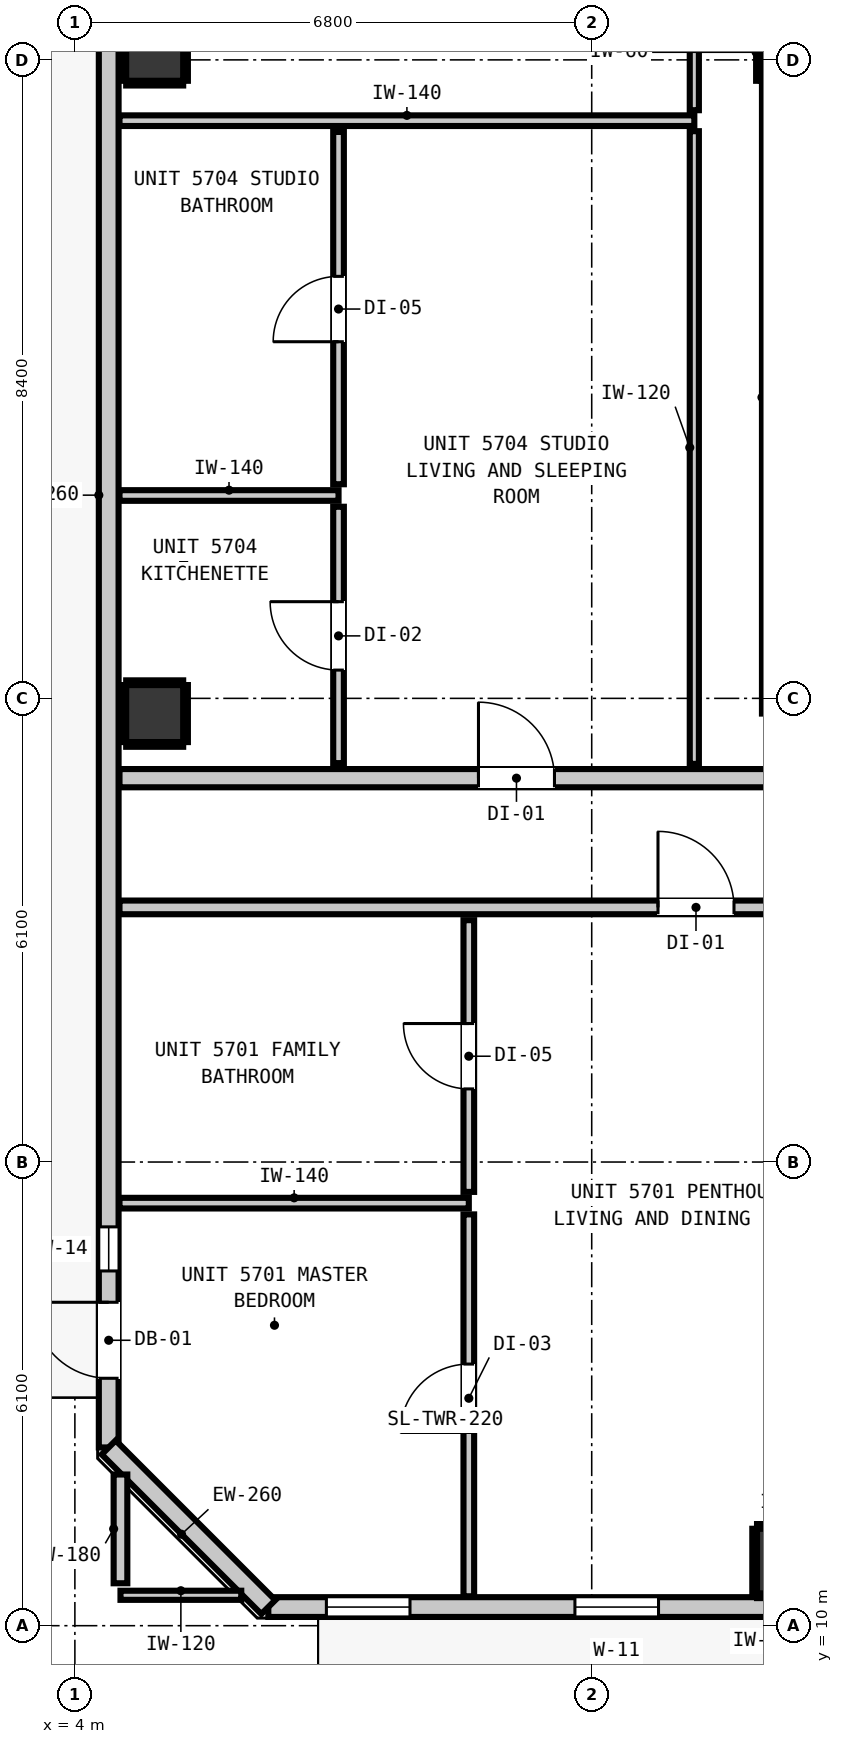
"""IFC4 building model, lengths in metres.
Left out: names, types, materials, properties, quantities, classifications, styles, units other than length and angle.
Written with IfcOpenShell. Run it as: python <this file> out.ifc"""

import sys

from ifc_helpers import new_model, si_unit, direction, frame, frame_2d, origin, origin_2d, place, context, subcontext, project, spatial, rectangle, extrude, element, fill, save


model = new_model("IFC4")
c1 = context("Model", 3, precision=1e-05, world=origin(), true_north=direction((0.0, 1.0)))
c2 = subcontext(c1, "Body", "Model", "MODEL_VIEW")
j1 = project(units=[si_unit("LENGTHUNIT", "METRE"), si_unit("PLANEANGLEUNIT", "RADIAN")], contexts=[c1])
p1 = place(None, origin())
s1 = spatial("IfcSite", under=j1, at=p1, CompositionType="ELEMENT")
p2 = place(p1, origin())
s2 = spatial("IfcBuilding", under=s1, at=p2, CompositionType="ELEMENT")
p3 = place(p2, frame((0.0, 0.0, 196.8)))
s3 = spatial("IfcBuildingStorey", under=s2, at=p3, CompositionType="ELEMENT", Elevation=196.8)
p4 = place(p3, frame((13.4, 30.7, 0.0), z_axis=(0.0, 0.0, 1.0), x_axis=(1.0, 0.0, 0.0)))
e1 = element("IfcColumn", 1, at=p4, inside=s3, PredefinedType="COLUMN", context=c2, shape_type="SweptSolid", body=[
    extrude(rectangle(XDim=0.75, YDim=0.75, at=origin_2d()), origin(), (0.0, 0.0, 1.0), 3.32),
])
p5 = place(p3, frame((13.44, 22.0, 0.0), z_axis=(0.0, 0.0, 1.0), x_axis=(0.0, 1.0, 0.0)))
e2 = element("IfcWall", 2, at=p5, inside=s3, PredefinedType="SHEAR", context=c2, shape_type="SweptSolid", body=[
    extrude(rectangle(XDim=8.32, YDim=0.8, at=frame_2d((4.16, 0.0))), origin(), (0.0, 0.0, 1.0), 3.32),
])
p6 = place(p3, frame((13.4, 10.85, 0.0), z_axis=(0.0, 0.0, 1.0), x_axis=(1.0, 0.0, 0.0)))
e3 = element("IfcColumn", 3, at=p6, inside=s3, PredefinedType="COLUMN", context=c2, shape_type="SweptSolid", body=[
    extrude(rectangle(XDim=0.85, YDim=0.85, at=origin_2d()), origin(), (0.0, 0.0, 1.0), 3.32),
])
for number, where, z_axis, x_axis in (
    (4, (5.05, 22.0, 0.0), (0.0, 0.0, 1.0), (1.0, 0.0, 0.0)),
    (5, (5.05, 30.7, 0.0), (0.0, 0.0, 1.0), (1.0, 0.0, 0.0)),
):
    element("IfcColumn", number, at=place(p3, frame(where, z_axis=z_axis, x_axis=x_axis)), inside=s3, PredefinedType="COLUMN", context=c2, shape_type="SweptSolid", body=[
        extrude(rectangle(XDim=0.75, YDim=0.75, at=origin_2d()), origin(), (0.0, 0.0, 1.0), 3.32),
    ])
p7 = place(p3, frame((4.445, 12.345, 0.0), z_axis=(0.0, 0.0, 1.0), x_axis=(0.0, 1.0, 0.0)))
e6 = element("IfcWall", 6, at=p7, inside=s3, PredefinedType="STANDARD", context=c2, shape_type="SweptSolid", body=[
    extrude(rectangle(XDim=30.31, YDim=0.26, at=frame_2d((15.155, 0.0))), origin(), (0.0, 0.0, 1.0), 3.1),
])
p8 = place(p7, frame((0.91, 0.0, 0.0)))
e7 = element("IfcOpeningElement", 7, at=p8, cuts=e6, PredefinedType="OPENING", context=c2, shape_type="SweptSolid", body=[
    extrude(rectangle(XDim=1.0, YDim=2.15, at=frame_2d((0.5, 1.075))), frame((0.0, 0.14, 0.0), z_axis=(0.0, -1.0, 0.0), x_axis=(1.0, 0.0, 0.0)), (0.0, 0.0, 1.0), 0.28),
])
p9 = place(p7, frame((2.322, 0.0, 0.85)))
e8 = element("IfcOpeningElement", 8, at=p9, cuts=e6, PredefinedType="OPENING", context=c2, shape_type="SweptSolid", body=[
    extrude(rectangle(XDim=0.58, YDim=1.5, at=frame_2d((0.29, 0.75))), frame((0.0, 0.14, 0.0), z_axis=(0.0, -1.0, 0.0), x_axis=(1.0, 0.0, 0.0)), (0.0, 0.0, 1.0), 0.28),
])
p10 = place(p7, frame((22.155, 0.0, 0.85)))
e9 = element("IfcOpeningElement", 9, at=p10, cuts=e6, PredefinedType="OPENING", context=c2, shape_type="SweptSolid", body=[
    extrude(rectangle(XDim=1.1, YDim=2.05, at=frame_2d((0.55, 1.025))), frame((0.0, 0.14, 0.0), z_axis=(0.0, -1.0, 0.0), x_axis=(1.0, 0.0, 0.0)), (0.0, 0.0, 1.0), 0.28),
])
p11 = place(p3, frame((39.255, 10.245, 0.0), z_axis=(0.0, 0.0, 1.0), x_axis=(-1.0, 0.0, 0.0)))
e10 = element("IfcWall", 10, at=p11, inside=s3, PredefinedType="STANDARD", context=c2, shape_type="SweptSolid", body=[
    extrude(rectangle(XDim=32.71, YDim=0.26, at=frame_2d((16.355, 0.0))), origin(), (0.0, 0.0, 1.0), 3.1),
])
p12 = place(p11, frame((3.721, 0.0, 0.0)))
e11 = element("IfcOpeningElement", 11, at=p12, cuts=e10, PredefinedType="OPENING", context=c2, shape_type="SweptSolid", body=[
    extrude(rectangle(XDim=1.0, YDim=2.15, at=frame_2d((0.5, 1.075))), frame((0.0, 0.14, 0.0), z_axis=(0.0, -1.0, 0.0), x_axis=(1.0, 0.0, 0.0)), (0.0, 0.0, 1.0), 0.28),
])
p13 = place(p11, frame((27.576, 0.0, 0.85)))
e12 = element("IfcOpeningElement", 12, at=p13, cuts=e10, PredefinedType="OPENING", context=c2, shape_type="SweptSolid", body=[
    extrude(rectangle(XDim=1.1, YDim=2.05, at=frame_2d((0.55, 1.025))), frame((0.0, 0.14, 0.0), z_axis=(0.0, -1.0, 0.0), x_axis=(1.0, 0.0, 0.0)), (0.0, 0.0, 1.0), 0.28),
])
p14 = place(p11, frame((30.846, 0.0, 0.85)))
e13 = element("IfcOpeningElement", 13, at=p14, cuts=e10, PredefinedType="OPENING", context=c2, shape_type="SweptSolid", body=[
    extrude(rectangle(XDim=1.1, YDim=2.05, at=frame_2d((0.55, 1.025))), frame((0.0, 0.14, 0.0), z_axis=(0.0, -1.0, 0.0), x_axis=(1.0, 0.0, 0.0)), (0.0, 0.0, 1.0), 0.28),
])
p15 = place(p11, frame((21.515, 0.0, 0.85)))
e14 = element("IfcOpeningElement", 14, at=p15, cuts=e10, PredefinedType="OPENING", context=c2, shape_type="SweptSolid", body=[
    extrude(rectangle(XDim=1.1, YDim=2.05, at=frame_2d((0.55, 1.025))), frame((0.0, 0.14, 0.0), z_axis=(0.0, -1.0, 0.0), x_axis=(1.0, 0.0, 0.0)), (0.0, 0.0, 1.0), 0.28),
])
p16 = place(p11, frame((15.878, 0.0, 0.85)))
e15 = element("IfcOpeningElement", 15, at=p16, cuts=e10, PredefinedType="OPENING", context=c2, shape_type="SweptSolid", body=[
    extrude(rectangle(XDim=1.1, YDim=2.05, at=frame_2d((0.55, 1.025))), frame((0.0, 0.14, 0.0), z_axis=(0.0, -1.0, 0.0), x_axis=(1.0, 0.0, 0.0)), (0.0, 0.0, 1.0), 0.28),
])
p17 = place(p11, frame((7.632, 0.0, 0.85)))
e16 = element("IfcOpeningElement", 16, at=p17, cuts=e10, PredefinedType="OPENING", context=c2, shape_type="SweptSolid", body=[
    extrude(rectangle(XDim=1.1, YDim=2.05, at=frame_2d((0.55, 1.025))), frame((0.0, 0.14, 0.0), z_axis=(0.0, -1.0, 0.0), x_axis=(1.0, 0.0, 0.0)), (0.0, 0.0, 1.0), 0.28),
])
p18 = place(p11, frame((12.631, 0.0, 0.85)))
e17 = element("IfcOpeningElement", 17, at=p18, cuts=e10, PredefinedType="OPENING", context=c2, shape_type="SweptSolid", body=[
    extrude(rectangle(XDim=1.1, YDim=2.05, at=frame_2d((0.55, 1.025))), frame((0.0, 0.14, 0.0), z_axis=(0.0, -1.0, 0.0), x_axis=(1.0, 0.0, 0.0)), (0.0, 0.0, 1.0), 0.28),
])
p19 = place(p11, frame((5.177, 0.0, 0.85)))
e18 = element("IfcOpeningElement", 18, at=p19, cuts=e10, PredefinedType="OPENING", context=c2, shape_type="SweptSolid", body=[
    extrude(rectangle(XDim=1.1, YDim=2.05, at=frame_2d((0.55, 1.025))), frame((0.0, 0.14, 0.0), z_axis=(0.0, -1.0, 0.0), x_axis=(1.0, 0.0, 0.0)), (0.0, 0.0, 1.0), 0.28),
])
p20 = place(p11, frame((0.293, 0.0, 0.85)))
e19 = element("IfcOpeningElement", 19, at=p20, cuts=e10, PredefinedType="OPENING", context=c2, shape_type="SweptSolid", body=[
    extrude(rectangle(XDim=0.58, YDim=1.5, at=frame_2d((0.29, 0.75))), frame((0.0, 0.14, 0.0), z_axis=(0.0, -1.0, 0.0), x_axis=(1.0, 0.0, 0.0)), (0.0, 0.0, 1.0), 0.28),
])
p21 = place(p3, frame((6.545, 10.245, 0.0), z_axis=(0.0, 0.0, 1.0), x_axis=(-0.707106781187, 0.707106781187, 0.0)))
e20 = element("IfcWall", 20, at=p21, inside=s3, PredefinedType="STANDARD", context=c2, shape_type="SweptSolid", body=[
    extrude(rectangle(XDim=2.97, YDim=0.26, at=frame_2d((1.485, 0.0))), origin(), (0.0, 0.0, 1.0), 3.1),
])
p22 = place(p3, frame((4.587, 21.15, 0.0), z_axis=(0.0, 0.0, 1.0), x_axis=(1.0, 0.0, 0.0)))
e21 = element("IfcWall", 21, at=p22, inside=s3, PredefinedType="PARTITIONING", context=c2, shape_type="SweptSolid", body=[
    extrude(rectangle(XDim=36.626, YDim=0.24, at=frame_2d((18.313, 0.0))), origin(), (0.0, 0.0, 1.0), 3.1),
])
p23 = place(p22, frame((13.623, 0.0, 0.0)))
e22 = element("IfcOpeningElement", 22, at=p23, cuts=e21, PredefinedType="OPENING", context=c2, shape_type="SweptSolid", body=[
    extrude(rectangle(XDim=1.1, YDim=2.15, at=frame_2d((0.55, 1.075))), frame((0.0, 0.13, 0.0), z_axis=(0.0, -1.0, 0.0), x_axis=(1.0, 0.0, 0.0)), (0.0, 0.0, 1.0), 0.26),
])
p24 = place(p22, frame((4.723, 0.0, 0.0)))
e23 = element("IfcOpeningElement", 23, at=p24, cuts=e21, PredefinedType="OPENING", context=c2, shape_type="SweptSolid", body=[
    extrude(rectangle(XDim=1.0, YDim=2.15, at=frame_2d((0.5, 1.075))), frame((0.0, 0.13, 0.0), z_axis=(0.0, -1.0, 0.0), x_axis=(1.0, 0.0, 0.0)), (0.0, 0.0, 1.0), 0.26),
])
p25 = place(p3, frame((4.587, 19.45, 0.0), z_axis=(0.0, 0.0, 1.0), x_axis=(1.0, 0.0, 0.0)))
e24 = element("IfcWall", 24, at=p25, inside=s3, PredefinedType="PARTITIONING", context=c2, shape_type="SweptSolid", body=[
    extrude(rectangle(XDim=36.626, YDim=0.18, at=frame_2d((18.313, 0.0))), origin(), (0.0, 0.0, 1.0), 3.1),
])
p26 = place(p25, frame((7.085, 0.0, 0.0)))
e25 = element("IfcOpeningElement", 25, at=p26, cuts=e24, PredefinedType="OPENING", context=c2, shape_type="SweptSolid", body=[
    extrude(rectangle(XDim=1.0, YDim=2.15, at=frame_2d((0.5, 1.075))), frame((0.0, 0.1, 0.0), z_axis=(0.0, -1.0, 0.0), x_axis=(1.0, 0.0, 0.0)), (0.0, 0.0, 1.0), 0.2),
])
p27 = place(p25, frame((25.034, 0.0, 0.0)))
e26 = element("IfcOpeningElement", 26, at=p27, cuts=e24, PredefinedType="OPENING", context=c2, shape_type="SweptSolid", body=[
    extrude(rectangle(XDim=1.0, YDim=2.15, at=frame_2d((0.5, 1.075))), frame((0.0, 0.1, 0.0), z_axis=(0.0, -1.0, 0.0), x_axis=(1.0, 0.0, 0.0)), (0.0, 0.0, 1.0), 0.2),
])
p28 = place(p3, frame((4.587, 15.559, 0.0), z_axis=(0.0, 0.0, 1.0), x_axis=(1.0, 0.0, 0.0)))
e27 = element("IfcWall", 27, at=p28, inside=s3, PredefinedType="PARTITIONING", context=c2, shape_type="SweptSolid", body=[
    extrude(rectangle(XDim=4.596, YDim=0.14, at=frame_2d((2.298, 0.0))), origin(), (0.0, 0.0, 1.0), 3.1),
])
p29 = place(p3, frame((4.587, 24.869, 0.0), z_axis=(0.0, 0.0, 1.0), x_axis=(1.0, 0.0, 0.0)))
e28 = element("IfcWall", 28, at=p29, inside=s3, PredefinedType="PARTITIONING", context=c2, shape_type="SweptSolid", body=[
    extrude(rectangle(XDim=2.882, YDim=0.14, at=frame_2d((1.441, 0.0))), origin(), (0.0, 0.0, 1.0), 3.1),
])
p30 = place(p3, frame((4.587, 29.8, 0.0), z_axis=(0.0, 0.0, 1.0), x_axis=(1.0, 0.0, 0.0)))
e29 = element("IfcWall", 29, at=p30, inside=s3, PredefinedType="PARTITIONING", context=c2, shape_type="SweptSolid", body=[
    extrude(rectangle(XDim=7.563, YDim=0.14, at=frame_2d((3.781, 0.0))), origin(), (0.0, 0.0, 1.0), 3.1),
])
p31 = place(p3, frame((4.6, 10.4, 0.0), z_axis=(0.0, 0.0, 1.0), x_axis=(1.0, 0.0, 0.0)))
e30 = element("IfcWall", 30, at=p31, inside=s3, PredefinedType="PARTITIONING", context=c2, shape_type="SweptSolid", body=[
    extrude(rectangle(XDim=1.589, YDim=0.12, at=frame_2d((0.794, 0.0))), origin(), (0.0, 0.0, 1.0), 3.1),
])
p32 = place(p3, frame((4.6, 10.558, 0.0), z_axis=(0.0, 0.0, 1.0), x_axis=(0.0, 1.0, 0.0)))
e31 = element("IfcWall", 31, at=p32, inside=s3, PredefinedType="PARTITIONING", context=c2, shape_type="SweptSolid", body=[
    extrude(rectangle(XDim=1.431, YDim=0.18, at=frame_2d((0.715, 0.0))), origin(), (0.0, 0.0, 1.0), 3.1),
])
p33 = place(p3, frame((7.469, 21.348, 0.0), z_axis=(0.0, 0.0, 1.0), x_axis=(0.0, 1.0, 0.0)))
e32 = element("IfcWall", 32, at=p33, inside=s3, PredefinedType="PARTITIONING", context=c2, shape_type="SweptSolid", body=[
    extrude(rectangle(XDim=3.373, YDim=0.14, at=frame_2d((1.687, 0.0))), origin(), (0.0, 0.0, 1.0), 3.1),
])
p34 = place(p33, frame((1.224, 0.0, 0.0)))
e33 = element("IfcOpeningElement", 33, at=p34, cuts=e32, PredefinedType="OPENING", context=c2, shape_type="SweptSolid", body=[
    extrude(rectangle(XDim=0.9, YDim=2.1, at=frame_2d((0.45, 1.05))), frame((0.0, 0.08, 0.0), z_axis=(0.0, -1.0, 0.0), x_axis=(1.0, 0.0, 0.0)), (0.0, 0.0, 1.0), 0.16),
])
p35 = place(p3, frame((7.469, 25.017, 0.0), z_axis=(0.0, 0.0, 1.0), x_axis=(0.0, 1.0, 0.0)))
e34 = element("IfcWall", 34, at=p35, inside=s3, PredefinedType="PARTITIONING", context=c2, shape_type="SweptSolid", body=[
    extrude(rectangle(XDim=4.635, YDim=0.14, at=frame_2d((2.317, 0.0))), origin(), (0.0, 0.0, 1.0), 3.1),
])
p36 = place(p35, frame((1.875, 0.0, 0.0)))
e35 = element("IfcOpeningElement", 35, at=p36, cuts=e34, PredefinedType="OPENING", context=c2, shape_type="SweptSolid", body=[
    extrude(rectangle(XDim=0.86, YDim=2.02, at=frame_2d((0.43, 1.01))), frame((0.0, 0.08, 0.0), z_axis=(0.0, -1.0, 0.0), x_axis=(1.0, 0.0, 0.0)), (0.0, 0.0, 1.0), 0.16),
])
p37 = place(p3, frame((9.183, 10.387, 0.0), z_axis=(0.0, 0.0, 1.0), x_axis=(0.0, 1.0, 0.0)))
e36 = element("IfcWall", 36, at=p37, inside=s3, PredefinedType="PARTITIONING", context=c2, shape_type="SweptSolid", body=[
    extrude(rectangle(XDim=5.024, YDim=0.14, at=frame_2d((2.512, 0.0))), origin(), (0.0, 0.0, 1.0), 3.1),
])
p38 = place(p37, frame((2.155, 0.0, 0.0)))
e37 = element("IfcOpeningElement", 37, at=p38, cuts=e36, PredefinedType="OPENING", context=c2, shape_type="SweptSolid", body=[
    extrude(rectangle(XDim=0.9, YDim=2.1, at=frame_2d((0.45, 1.05))), frame((0.0, 0.08, 0.0), z_axis=(0.0, -1.0, 0.0), x_axis=(1.0, 0.0, 0.0)), (0.0, 0.0, 1.0), 0.16),
])
p39 = place(p3, frame((9.183, 15.707, 0.0), z_axis=(0.0, 0.0, 1.0), x_axis=(0.0, 1.0, 0.0)))
e38 = element("IfcWall", 38, at=p39, inside=s3, PredefinedType="PARTITIONING", context=c2, shape_type="SweptSolid", body=[
    extrude(rectangle(XDim=3.575, YDim=0.14, at=frame_2d((1.788, 0.0))), origin(), (0.0, 0.0, 1.0), 2.477),
])
p40 = place(p39, frame((1.355, 0.0, 0.0)))
e39 = element("IfcOpeningElement", 39, at=p40, cuts=e38, PredefinedType="OPENING", context=c2, shape_type="SweptSolid", body=[
    extrude(rectangle(XDim=0.86, YDim=2.02, at=frame_2d((0.43, 1.01))), frame((0.0, 0.08, 0.0), z_axis=(0.0, -1.0, 0.0), x_axis=(1.0, 0.0, 0.0)), (0.0, 0.0, 1.0), 0.16),
])
p41 = place(p3, frame((12.15, 21.338, 0.0), z_axis=(0.0, 0.0, 1.0), x_axis=(0.0, 1.0, 0.0)))
e40 = element("IfcWall", 40, at=p41, inside=s3, PredefinedType="PARTITIONING", context=c2, shape_type="SweptSolid", body=[
    extrude(rectangle(XDim=8.324, YDim=0.12, at=frame_2d((4.162, 0.0))), origin(), (0.0, 0.0, 1.0), 3.1),
])
p42 = place(p3, frame((12.15, 29.938, 0.0), z_axis=(0.0, 0.0, 1.0), x_axis=(0.0, 1.0, 0.0)))
e41 = element("IfcWall", 41, at=p42, inside=s3, PredefinedType="PARTITIONING", context=c2, shape_type="SweptSolid", body=[
    extrude(rectangle(XDim=10.154, YDim=0.12, at=frame_2d((5.077, 0.0))), origin(), (0.0, 0.0, 1.0), 3.1),
])
p43 = place(p3, frame((12.993, 30.325, 0.0), z_axis=(0.0, 0.0, 1.0), x_axis=(0.0, 1.0, 0.0)))
e42 = element("IfcWall", 42, at=p43, inside=s3, PredefinedType="PARTITIONING", context=c2, shape_type="SweptSolid", body=[
    extrude(rectangle(XDim=0.75, YDim=0.06, at=frame_2d((0.375, 0.0))), origin(), (0.0, 0.0, 1.0), 1.45),
])
for number, where, z_axis, x_axis in (
    (43, (12.975, 10.393, 0.0), (0.0, 0.0, 1.0), (1.0, 0.0, 0.0)),
    (44, (12.975, 11.307, 0.0), (0.0, 0.0, 1.0), (1.0, 0.0, 0.0)),
    (45, (12.943, 10.425, 0.0), (0.0, 0.0, 1.0), (0.0, 1.0, 0.0)),
):
    element("IfcWall", number, at=place(p3, frame(where, z_axis=z_axis, x_axis=x_axis)), inside=s3, PredefinedType="PARTITIONING", context=c2, shape_type="SweptSolid", body=[
        extrude(rectangle(XDim=0.85, YDim=0.06, at=frame_2d((0.425, 0.0))), origin(), (0.0, 0.0, 1.0), 1.45),
    ])
for number, where, z_axis, x_axis in (
    (46, (4.675, 21.593, 0.0), (0.0, 0.0, 1.0), (1.0, 0.0, 0.0)),
    (47, (4.675, 22.407, 0.0), (0.0, 0.0, 1.0), (1.0, 0.0, 0.0)),
    (48, (4.643, 21.625, 0.0), (0.0, 0.0, 1.0), (0.0, 1.0, 0.0)),
    (49, (5.457, 21.625, 0.0), (0.0, 0.0, 1.0), (0.0, 1.0, 0.0)),
    (50, (4.675, 30.293, 0.0), (0.0, 0.0, 1.0), (1.0, 0.0, 0.0)),
    (51, (4.643, 30.325, 0.0), (0.0, 0.0, 1.0), (0.0, 1.0, 0.0)),
    (52, (5.457, 30.325, 0.0), (0.0, 0.0, 1.0), (0.0, 1.0, 0.0)),
):
    element("IfcWall", number, at=place(p3, frame(where, z_axis=z_axis, x_axis=x_axis)), inside=s3, PredefinedType="PARTITIONING", context=c2, shape_type="SweptSolid", body=[
        extrude(rectangle(XDim=0.75, YDim=0.06, at=frame_2d((0.375, 0.0))), origin(), (0.0, 0.0, 1.0), 1.45),
    ])
p44 = place(p8, origin())
e53 = element("IfcDoor", 53, at=p44, inside=s3, OperationType="SINGLE_SWING_RIGHT", PredefinedType="DOOR", context=c2, shape_type="SweptSolid", body=[
    extrude(rectangle(XDim=1.0, YDim=2.15, at=frame_2d((0.5, 1.075))), frame((0.0, 0.025, 0.0), z_axis=(0.0, -1.0, 0.0), x_axis=(1.0, 0.0, 0.0)), (0.0, 0.0, 1.0), 0.05),
])
fill(e7, e53)
p45 = place(p9, origin())
e54 = element("IfcWindow", 54, at=p45, inside=s3, PartitioningType="SINGLE_PANEL", PredefinedType="WINDOW", context=c2, shape_type="SweptSolid", body=[
    extrude(rectangle(XDim=0.58, YDim=1.5, at=frame_2d((0.29, 0.75))), frame((0.0, 0.03, 0.0), z_axis=(0.0, -1.0, 0.0), x_axis=(1.0, 0.0, 0.0)), (0.0, 0.0, 1.0), 0.06),
])
fill(e8, e54)
p46 = place(p13, origin())
e55 = element("IfcWindow", 55, at=p46, inside=s3, PartitioningType="SINGLE_PANEL", PredefinedType="WINDOW", context=c2, shape_type="SweptSolid", body=[
    extrude(rectangle(XDim=1.1, YDim=2.05, at=frame_2d((0.55, 1.025))), frame((0.0, 0.03, 0.0), z_axis=(0.0, -1.0, 0.0), x_axis=(1.0, 0.0, 0.0)), (0.0, 0.0, 1.0), 0.06),
])
fill(e12, e55)
p47 = place(p14, origin())
e56 = element("IfcWindow", 56, at=p47, inside=s3, PartitioningType="SINGLE_PANEL", PredefinedType="WINDOW", context=c2, shape_type="SweptSolid", body=[
    extrude(rectangle(XDim=1.1, YDim=2.05, at=frame_2d((0.55, 1.025))), frame((0.0, 0.03, 0.0), z_axis=(0.0, -1.0, 0.0), x_axis=(1.0, 0.0, 0.0)), (0.0, 0.0, 1.0), 0.06),
])
fill(e13, e56)
p48 = place(p26, origin())
e57 = element("IfcDoor", 57, at=p48, inside=s3, OperationType="SINGLE_SWING_LEFT", PredefinedType="DOOR", context=c2, shape_type="SweptSolid", body=[
    extrude(rectangle(XDim=1.0, YDim=2.15, at=frame_2d((0.5, 1.075))), frame((0.0, 0.025, 0.0), z_axis=(0.0, -1.0, 0.0), x_axis=(1.0, 0.0, 0.0)), (0.0, 0.0, 1.0), 0.05),
])
fill(e25, e57)
p49 = place(p40, origin())
e58 = element("IfcDoor", 58, at=p49, inside=s3, OperationType="SINGLE_SWING_RIGHT", PredefinedType="DOOR", context=c2, shape_type="SweptSolid", body=[
    extrude(rectangle(XDim=0.86, YDim=2.02, at=frame_2d((0.43, 1.01))), frame((0.0, 0.025, 0.0), z_axis=(0.0, -1.0, 0.0), x_axis=(1.0, 0.0, 0.0)), (0.0, 0.0, 1.0), 0.05),
])
fill(e39, e58)
p50 = place(p38, origin())
e59 = element("IfcDoor", 59, at=p50, inside=s3, OperationType="SINGLE_SWING_LEFT", PredefinedType="DOOR", context=c2, shape_type="SweptSolid", body=[
    extrude(rectangle(XDim=0.9, YDim=2.1, at=frame_2d((0.45, 1.05))), frame((0.0, 0.025, 0.0), z_axis=(0.0, -1.0, 0.0), x_axis=(1.0, 0.0, 0.0)), (0.0, 0.0, 1.0), 0.05),
])
fill(e37, e59)
p51 = place(p24, origin())
e60 = element("IfcDoor", 60, at=p51, inside=s3, OperationType="SINGLE_SWING_LEFT", PredefinedType="DOOR", context=c2, shape_type="SweptSolid", body=[
    extrude(rectangle(XDim=1.0, YDim=2.15, at=frame_2d((0.5, 1.075))), frame((0.0, 0.025, 0.0), z_axis=(0.0, -1.0, 0.0), x_axis=(1.0, 0.0, 0.0)), (0.0, 0.0, 1.0), 0.05),
])
fill(e23, e60)
p52 = place(p34, origin())
e61 = element("IfcDoor", 61, at=p52, inside=s3, OperationType="SINGLE_SWING_RIGHT", PredefinedType="DOOR", context=c2, shape_type="SweptSolid", body=[
    extrude(rectangle(XDim=0.9, YDim=2.1, at=frame_2d((0.45, 1.05))), frame((0.0, 0.025, 0.0), z_axis=(0.0, -1.0, 0.0), x_axis=(1.0, 0.0, 0.0)), (0.0, 0.0, 1.0), 0.05),
])
fill(e33, e61)
p53 = place(p36, origin())
e62 = element("IfcDoor", 62, at=p53, inside=s3, OperationType="SINGLE_SWING_LEFT", PredefinedType="DOOR", context=c2, shape_type="SweptSolid", body=[
    extrude(rectangle(XDim=0.86, YDim=2.02, at=frame_2d((0.43, 1.01))), frame((0.0, 0.025, 0.0), z_axis=(0.0, -1.0, 0.0), x_axis=(1.0, 0.0, 0.0)), (0.0, 0.0, 1.0), 0.05),
])
fill(e35, e62)
save(model, sys.argv[1])
